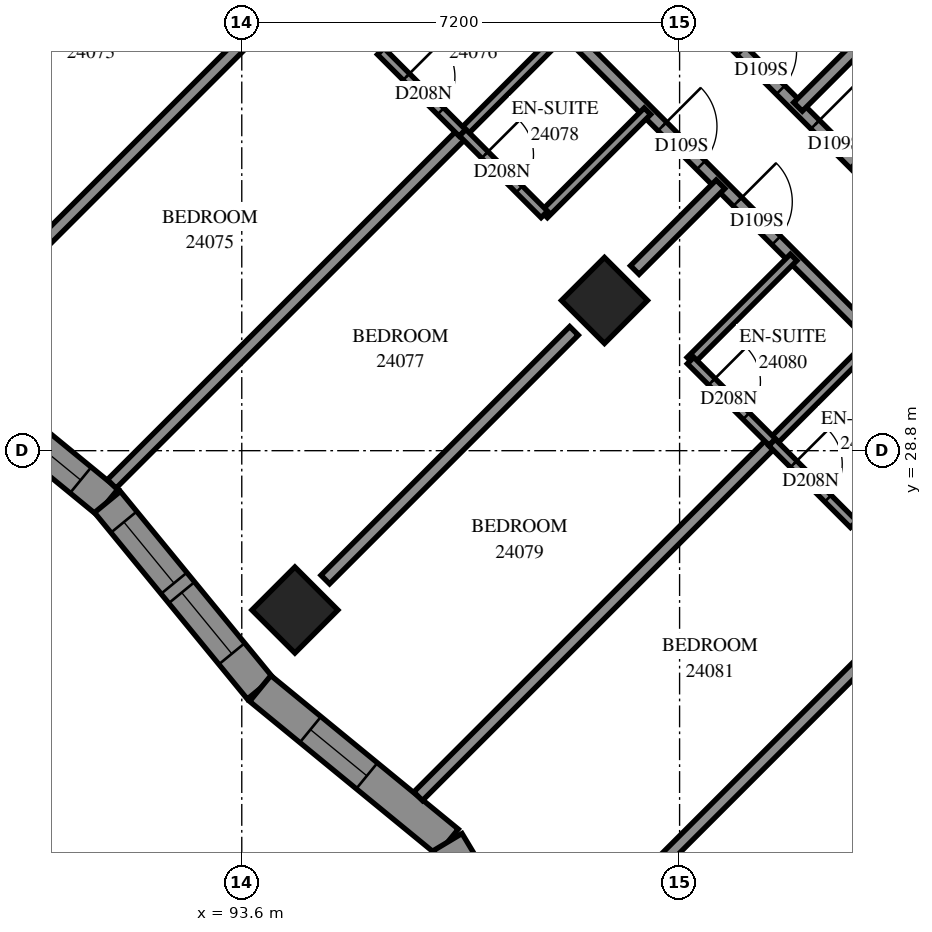
"""IFC4 building model, lengths in metres.
Left out: names, types, materials, properties, quantities, classifications, styles, units other than length and angle.
Written with IfcOpenShell. Run it as: python <this file> out.ifc"""

import sys

from ifc_helpers import new_model, si_unit, direction, frame, frame_2d, origin, origin_2d, place, context, subcontext, project, spatial, polyline, rectangle, outline, extrude, element, fill, save


model = new_model("IFC4")
c1 = context("Model", 3, precision=1e-05, world=origin(), true_north=direction((0.0, 1.0)))
c2 = subcontext(c1, "Body", "Model", "MODEL_VIEW")
j1 = project(units=[si_unit("LENGTHUNIT", "METRE"), si_unit("PLANEANGLEUNIT", "RADIAN")], contexts=[c1])
p1 = place(None, origin())
s1 = spatial("IfcSite", under=j1, at=p1, CompositionType="ELEMENT")
p2 = place(p1, origin())
s2 = spatial("IfcBuilding", under=s1, at=p2, CompositionType="ELEMENT")
p3 = place(p2, frame((0.0, 0.0, 91.4)))
s3 = spatial("IfcBuildingStorey", under=s2, at=p3, CompositionType="ELEMENT", Elevation=91.4)
for number, where, z_axis, x_axis in (
    (1, (99.565, 31.271, 0.0), (0.0, 0.0, 1.0), (0.707, -0.707, 0.0)),
    (2, (94.474, 26.18, 0.0), (0.0, 0.0, 1.0), (0.707, -0.707, 0.0)),
):
    element("IfcColumn", number, at=place(p3, frame(where, z_axis=z_axis, x_axis=x_axis)), inside=s3, PredefinedType="COLUMN", context=c2, shape_type="SweptSolid", body=[
        extrude(rectangle(XDim=1.0, YDim=1.0, at=origin_2d()), origin(), (0.0, 0.0, 1.0), 3.1),
    ])
p4 = place(p3, frame((88.324, 30.47, 0.0), z_axis=(0.0, 0.0, 1.0), x_axis=(0.7733872397, -0.6339338904, 0.0)))
e3 = element("IfcWall", 3, at=p4, inside=s3, PredefinedType="SOLIDWALL", context=c2, shape_type="SweptSolid", body=[
    extrude(outline(polyline([(-0.027, -0.275), (3.938, -0.275), (3.992, 0.275), (0.027, 0.275), (-0.027, -0.275)])), origin(), (0.0, 0.0, 1.0), 3.1),
])
p5 = place(p4, frame((0.596, 0.0, 0.5)))
e4 = element("IfcOpeningElement", 4, at=p5, cuts=e3, PredefinedType="OPENING", context=c2, shape_type="SweptSolid", body=[
    extrude(rectangle(XDim=1.3, YDim=2.45, at=frame_2d((0.65, 1.225))), frame((0.0, 0.285, 0.0), z_axis=(0.0, -1.0, 0.0), x_axis=(1.0, 0.0, 0.0)), (0.0, 0.0, 1.0), 0.57),
])
p6 = place(p4, frame((2.096, 0.0, 0.5)))
e5 = element("IfcOpeningElement", 5, at=p6, cuts=e3, PredefinedType="OPENING", context=c2, shape_type="SweptSolid", body=[
    extrude(rectangle(XDim=1.3, YDim=2.45, at=frame_2d((0.65, 1.225))), frame((0.0, 0.285, 0.0), z_axis=(0.0, -1.0, 0.0), x_axis=(1.0, 0.0, 0.0)), (0.0, 0.0, 1.0), 0.57),
])
p7 = place(p3, frame((91.391, 27.956, 0.0), z_axis=(0.0, 0.0, 1.0), x_axis=(0.633918804, -0.7733996056, 0.0)))
e6 = element("IfcWall", 6, at=p7, inside=s3, PredefinedType="SOLIDWALL", context=c2, shape_type="SweptSolid", body=[
    extrude(outline(polyline([(0.027, -0.275), (3.992, -0.275), (3.938, 0.275), (-0.027, 0.275), (0.027, -0.275)])), origin(), (0.0, 0.0, 1.0), 3.1),
])
p8 = place(p7, frame((0.426, 0.0, 0.5)))
e7 = element("IfcOpeningElement", 7, at=p8, cuts=e6, PredefinedType="OPENING", context=c2, shape_type="SweptSolid", body=[
    extrude(rectangle(XDim=1.3, YDim=2.45, at=frame_2d((0.65, 1.225))), frame((0.0, 0.285, 0.0), z_axis=(0.0, -1.0, 0.0), x_axis=(1.0, 0.0, 0.0)), (0.0, 0.0, 1.0), 0.57),
])
p9 = place(p7, frame((1.927, 0.0, 0.5)))
e8 = element("IfcOpeningElement", 8, at=p9, cuts=e6, PredefinedType="OPENING", context=c2, shape_type="SweptSolid", body=[
    extrude(rectangle(XDim=1.3, YDim=2.45, at=frame_2d((0.65, 1.225))), frame((0.0, 0.285, 0.0), z_axis=(0.0, -1.0, 0.0), x_axis=(1.0, 0.0, 0.0)), (0.0, 0.0, 1.0), 0.57),
])
p10 = place(p3, frame((93.904, 24.89, 0.0), z_axis=(0.0, 0.0, 1.0), x_axis=(0.7734013817, -0.6339166371, 0.0)))
e9 = element("IfcWall", 9, at=p10, inside=s3, PredefinedType="SOLIDWALL", context=c2, shape_type="SweptSolid", body=[
    extrude(outline(polyline([(-0.027, -0.275), (3.938, -0.275), (4.033, 0.275), (0.027, 0.275), (-0.027, -0.275)])), origin(), (0.0, 0.0, 1.0), 3.1),
])
p11 = place(p10, frame((1.067, 0.0, 0.5)))
e10 = element("IfcOpeningElement", 10, at=p11, cuts=e9, PredefinedType="OPENING", context=c2, shape_type="SweptSolid", body=[
    extrude(rectangle(XDim=1.2, YDim=2.45, at=frame_2d((0.6, 1.225))), frame((0.0, 0.285, 0.0), z_axis=(0.0, -1.0, 0.0), x_axis=(1.0, 0.0, 0.0)), (0.0, 0.0, 1.0), 0.57),
])
p12 = place(p3, frame((96.986, 22.363, 0.0), z_axis=(0.0, 0.0, 1.0), x_axis=(0.5135466486, -0.8580616759, 0.0)))
e11 = element("IfcWall", 11, at=p12, inside=s3, PredefinedType="SOLIDWALL", context=c2, shape_type="SweptSolid", body=[
    extrude(outline(polyline([(0.048, -0.275), (4.116, -0.275), (3.665, 0.275), (-0.048, 0.275), (0.048, -0.275)])), origin(), (0.0, 0.0, 1.0), 3.1),
])
p13 = place(p12, frame((0.905, 0.0, 0.5)))
e12 = element("IfcOpeningElement", 12, at=p13, cuts=e11, PredefinedType="OPENING", context=c2, shape_type="SweptSolid", body=[
    extrude(rectangle(XDim=1.2, YDim=2.45, at=frame_2d((0.6, 1.225))), frame((0.0, 0.285, 0.0), z_axis=(0.0, -1.0, 0.0), x_axis=(1.0, 0.0, 0.0)), (0.0, 0.0, 1.0), 0.57),
])
p14 = place(p3, frame((93.339, 41.309, 0.0), z_axis=(0.0, 0.0, 1.0), x_axis=(0.7071067812, -0.7071067812, 0.0)))
e13 = element("IfcWall", 13, at=p14, inside=s3, PredefinedType="PARTITIONING", context=c2, shape_type="SweptSolid", body=[
    extrude(rectangle(XDim=18.702, YDim=0.2, at=frame_2d((9.351, 0.0))), origin(), (0.0, 0.0, 1.0), 3.1),
])
p15 = place(p14, frame((3.05, 0.0, 0.0)))
e14 = element("IfcOpeningElement", 14, at=p15, cuts=e13, PredefinedType="OPENING", context=c2, shape_type="SweptSolid", body=[
    extrude(rectangle(XDim=0.9, YDim=2.1, at=frame_2d((0.45, 1.05))), frame((0.0, 0.11, 0.0), z_axis=(0.0, -1.0, 0.0), x_axis=(1.0, 0.0, 0.0)), (0.0, 0.0, 1.0), 0.22),
])
p16 = place(p14, frame((4.7, 0.0, 0.0)))
e15 = element("IfcOpeningElement", 15, at=p16, cuts=e13, PredefinedType="OPENING", context=c2, shape_type="SweptSolid", body=[
    extrude(rectangle(XDim=0.9, YDim=2.1, at=frame_2d((0.45, 1.05))), frame((0.0, 0.11, 0.0), z_axis=(0.0, -1.0, 0.0), x_axis=(1.0, 0.0, 0.0)), (0.0, 0.0, 1.0), 0.22),
])
p17 = place(p14, frame((10.149, 0.0, 0.0)))
e16 = element("IfcOpeningElement", 16, at=p17, cuts=e13, PredefinedType="OPENING", context=c2, shape_type="SweptSolid", body=[
    extrude(rectangle(XDim=0.9, YDim=2.1, at=frame_2d((0.45, 1.05))), frame((0.0, 0.11, 0.0), z_axis=(0.0, -1.0, 0.0), x_axis=(1.0, 0.0, 0.0)), (0.0, 0.0, 1.0), 0.22),
])
p18 = place(p14, frame((11.9, 0.0, 0.0)))
e17 = element("IfcOpeningElement", 17, at=p18, cuts=e13, PredefinedType="OPENING", context=c2, shape_type="SweptSolid", body=[
    extrude(rectangle(XDim=0.9, YDim=2.1, at=frame_2d((0.45, 1.05))), frame((0.0, 0.11, 0.0), z_axis=(0.0, -1.0, 0.0), x_axis=(1.0, 0.0, 0.0)), (0.0, 0.0, 1.0), 0.22),
])
p19 = place(p14, frame((17.45, 0.0, 0.0)))
e18 = element("IfcOpeningElement", 18, at=p19, cuts=e13, PredefinedType="OPENING", context=c2, shape_type="SweptSolid", body=[
    extrude(rectangle(XDim=0.9, YDim=2.1, at=frame_2d((0.45, 1.05))), frame((0.0, 0.11, 0.0), z_axis=(0.0, -1.0, 0.0), x_axis=(1.0, 0.0, 0.0)), (0.0, 0.0, 1.0), 0.22),
])
p20 = place(p3, frame((86.835, 34.806, 0.0), z_axis=(0.0, 0.0, 1.0), x_axis=(0.7071067812, 0.7071067812, 0.0)))
e19 = element("IfcWall", 19, at=p20, inside=s3, PredefinedType="PARTITIONING", context=c2, shape_type="SweptSolid", body=[
    extrude(rectangle(XDim=9.201, YDim=0.2, at=frame_2d((4.601, 0.0))), origin(), (0.0, 0.0, 1.0), 3.1),
])
p21 = place(p3, frame((96.501, 23.117, 0.0), z_axis=(0.0, 0.0, 1.0), x_axis=(0.7071128537, 0.7071007086, 0.0)))
e20 = element("IfcWall", 20, at=p21, inside=s3, PredefinedType="PARTITIONING", context=c2, shape_type="SweptSolid", body=[
    extrude(rectangle(XDim=8.234, YDim=0.2, at=frame_2d((4.117, 0.0))), origin(), (0.0, 0.0, 1.0), 3.1),
])
p22 = place(p3, frame((86.345, 33.319, 0.0), z_axis=(0.0, 0.0, 1.0), x_axis=(0.7069848221, 0.7072287193, 0.0)))
e21 = element("IfcWall", 21, at=p22, inside=s3, PredefinedType="PARTITIONING", context=c2, shape_type="SweptSolid", body=[
    extrude(rectangle(XDim=8.2, YDim=0.2, at=frame_2d((4.1, 0.0))), origin(), (0.0, 0.0, 1.0), 3.1),
])
p23 = place(p3, frame((91.462, 28.254, 0.0), z_axis=(0.0, 0.0, 1.0), x_axis=(0.7072292685, 0.7069842727, 0.0)))
e22 = element("IfcWall", 22, at=p23, inside=s3, PredefinedType="PARTITIONING", context=c2, shape_type="SweptSolid", body=[
    extrude(rectangle(XDim=8.163, YDim=0.2, at=frame_2d((4.082, 0.0))), origin(), (0.0, 0.0, 1.0), 3.1),
])
p24 = place(p3, frame((100.062, 21.588, 0.0), z_axis=(0.0, 0.0, 1.0), x_axis=(0.7071067812, 0.7071067812, 0.0)))
e23 = element("IfcWall", 23, at=p24, inside=s3, PredefinedType="PARTITIONING", context=c2, shape_type="SweptSolid", body=[
    extrude(rectangle(XDim=5.79, YDim=0.2, at=frame_2d((2.895, 0.0))), origin(), (0.0, 0.0, 1.0), 2.6),
])
p25 = place(p3, frame((89.881, 31.771, 0.0), z_axis=(0.0, 0.0, 1.0), x_axis=(0.7071067812, 0.7071067812, 0.0)))
e24 = element("IfcWall", 24, at=p25, inside=s3, PredefinedType="PARTITIONING", context=c2, shape_type="SweptSolid", body=[
    extrude(rectangle(XDim=5.787, YDim=0.2, at=frame_2d((2.893, 0.0))), origin(), (0.0, 0.0, 1.0), 3.1),
])
p26 = place(p3, frame((94.973, 26.681, 0.0), z_axis=(0.0, 0.0, 1.0), x_axis=(0.7071067812, 0.7071067812, 0.0)))
e25 = element("IfcWall", 25, at=p26, inside=s3, PredefinedType="PARTITIONING", context=c2, shape_type="SweptSolid", body=[
    extrude(rectangle(XDim=5.784, YDim=0.2, at=frame_2d((2.892, 0.0))), origin(), (0.0, 0.0, 1.0), 3.1),
])
p27 = place(p3, frame((101.541, 35.651, 0.0), z_axis=(0.0, 0.0, 1.0), x_axis=(0.7071067812, -0.7071067812, 0.0)))
e26 = element("IfcWall", 26, at=p27, inside=s3, PredefinedType="PARTITIONING", context=c2, shape_type="SweptSolid", body=[
    extrude(rectangle(XDim=3.4, YDim=0.2, at=frame_2d((1.7, 0.0))), origin(), (0.0, 0.0, 1.0), 3.1),
])
p28 = place(p27, frame((0.4, 0.0, 0.0)))
e27 = element("IfcOpeningElement", 27, at=p28, cuts=e26, PredefinedType="OPENING", context=c2, shape_type="SweptSolid", body=[
    extrude(rectangle(XDim=0.9, YDim=2.1, at=frame_2d((0.45, 1.05))), frame((0.0, 0.11, 0.0), z_axis=(0.0, -1.0, 0.0), x_axis=(1.0, 0.0, 0.0)), (0.0, 0.0, 1.0), 0.22),
])
p29 = place(p27, frame((2.105, 0.0, 0.0)))
e28 = element("IfcOpeningElement", 28, at=p29, cuts=e26, PredefinedType="OPENING", context=c2, shape_type="SweptSolid", body=[
    extrude(rectangle(XDim=0.9, YDim=2.1, at=frame_2d((0.45, 1.05))), frame((0.0, 0.11, 0.0), z_axis=(0.0, -1.0, 0.0), x_axis=(1.0, 0.0, 0.0)), (0.0, 0.0, 1.0), 0.22),
])
for number, where, z_axis, x_axis in (
    (29, (100.977, 30.281, 0.0), (0.0, 0.0, 1.0), (0.707, 0.707, 0.0)),
    (30, (98.573, 32.685, 0.0), (0.0, 0.0, 1.0), (0.707, 0.707, 0.0)),
):
    element("IfcWall", number, at=place(p3, frame(where, z_axis=z_axis, x_axis=x_axis)), inside=s3, PredefinedType="PARTITIONING", context=c2, shape_type="SweptSolid", body=[
        extrude(rectangle(XDim=2.401, YDim=0.15, at=frame_2d((1.201, 0.0))), origin(), (0.0, 0.0, 1.0), 3.1),
    ])
p30 = place(p3, frame((97.234, 34.026, 0.0), z_axis=(0.0, 0.0, 1.0), x_axis=(0.706689978, 0.7075233388, 0.0)))
e31 = element("IfcWall", 31, at=p30, inside=s3, PredefinedType="PARTITIONING", context=c2, shape_type="SweptSolid", body=[
    extrude(rectangle(XDim=2.4, YDim=0.15, at=frame_2d((1.2, 0.0))), origin(), (0.0, 0.0, 1.0), 3.1),
])
for number, where, z_axis, x_axis in (
    (32, (95.887, 35.373, 0.0), (0.0, 0.0, 1.0), (0.707, 0.707, 0.0)),
    (33, (102.323, 28.939, 0.0), (0.0, 0.0, 1.0), (0.707, 0.707, 0.0)),
    (34, (103.665, 27.595, 0.0), (0.0, 0.0, 1.0), (0.707, 0.707, 0.0)),
):
    element("IfcWall", number, at=place(p3, frame(where, z_axis=z_axis, x_axis=x_axis)), inside=s3, PredefinedType="PARTITIONING", context=c2, shape_type="SweptSolid", body=[
        extrude(rectangle(XDim=2.398, YDim=0.15, at=frame_2d((1.199, 0.0))), origin(), (0.0, 0.0, 1.0), 3.1),
    ])
p31 = place(p3, frame((100.063, 31.771, 0.0), z_axis=(0.0, 0.0, 1.0), x_axis=(0.7071067812, 0.7071067812, 0.0)))
e35 = element("IfcWall", 35, at=p31, inside=s3, PredefinedType="PARTITIONING", context=c2, shape_type="SweptSolid", body=[
    extrude(rectangle(XDim=1.994, YDim=0.2, at=frame_2d((0.997, 0.0))), origin(), (0.0, 0.0, 1.0), 3.1),
])
p32 = place(p3, frame((102.747, 34.455, 0.0), z_axis=(0.0, 0.0, 1.0), x_axis=(0.7071067812, 0.7071067812, 0.0)))
e36 = element("IfcWall", 36, at=p32, inside=s3, PredefinedType="PARTITIONING", context=c2, shape_type="SweptSolid", body=[
    extrude(rectangle(XDim=1.991, YDim=0.2, at=frame_2d((0.996, 0.0))), origin(), (0.0, 0.0, 1.0), 3.1),
])
p33 = place(p3, frame((95.885, 35.369, 0.0), z_axis=(0.0, 0.0, 1.0), x_axis=(0.7071067812, -0.7071067812, 0.0)))
e37 = element("IfcWall", 37, at=p33, inside=s3, PredefinedType="PARTITIONING", context=c2, shape_type="SweptSolid", body=[
    extrude(rectangle(XDim=1.901, YDim=0.15, at=frame_2d((0.95, 0.0))), origin(), (0.0, 0.0, 1.0), 3.1),
])
p34 = place(p33, frame((0.595, 0.0, 0.0)))
e38 = element("IfcOpeningElement", 38, at=p34, cuts=e37, PredefinedType="OPENING", context=c2, shape_type="SweptSolid", body=[
    extrude(rectangle(XDim=0.8, YDim=2.1, at=frame_2d((0.4, 1.05))), frame((0.0, 0.085, 0.0), z_axis=(0.0, -1.0, 0.0), x_axis=(1.0, 0.0, 0.0)), (0.0, 0.0, 1.0), 0.17),
])
p35 = place(p3, frame((100.981, 30.283, 0.0), z_axis=(0.0, 0.0, 1.0), x_axis=(0.7076330979, -0.7065800724, 0.0)))
e39 = element("IfcWall", 39, at=p35, inside=s3, PredefinedType="PARTITIONING", context=c2, shape_type="SweptSolid", body=[
    extrude(rectangle(XDim=1.899, YDim=0.15, at=frame_2d((0.95, 0.0))), origin(), (0.0, 0.0, 1.0), 3.1),
])
p36 = place(p35, frame((0.493, 0.0, 0.0)))
e40 = element("IfcOpeningElement", 40, at=p36, cuts=e39, PredefinedType="OPENING", context=c2, shape_type="SweptSolid", body=[
    extrude(rectangle(XDim=0.8, YDim=2.1, at=frame_2d((0.4, 1.05))), frame((0.0, 0.085, 0.0), z_axis=(0.0, -1.0, 0.0), x_axis=(1.0, 0.0, 0.0)), (0.0, 0.0, 1.0), 0.17),
])
p37 = place(p3, frame((97.233, 34.029, 0.0), z_axis=(0.0, 0.0, 1.0), x_axis=(0.7065800724, -0.7076330979, 0.0)))
e41 = element("IfcWall", 41, at=p37, inside=s3, PredefinedType="PARTITIONING", context=c2, shape_type="SweptSolid", body=[
    extrude(rectangle(XDim=1.899, YDim=0.15, at=frame_2d((0.95, 0.0))), origin(), (0.0, 0.0, 1.0), 3.1),
])
p38 = place(p37, frame((0.515, 0.0, 0.0)))
e42 = element("IfcOpeningElement", 42, at=p38, cuts=e41, PredefinedType="OPENING", context=c2, shape_type="SweptSolid", body=[
    extrude(rectangle(XDim=0.8, YDim=2.1, at=frame_2d((0.4, 1.05))), frame((0.0, 0.085, 0.0), z_axis=(0.0, -1.0, 0.0), x_axis=(1.0, 0.0, 0.0)), (0.0, 0.0, 1.0), 0.17),
])
p39 = place(p3, frame((102.321, 28.935, 0.0), z_axis=(0.0, 0.0, 1.0), x_axis=(0.7065800724, -0.7076330979, 0.0)))
e43 = element("IfcWall", 43, at=p39, inside=s3, PredefinedType="PARTITIONING", context=c2, shape_type="SweptSolid", body=[
    extrude(rectangle(XDim=1.899, YDim=0.15, at=frame_2d((0.95, 0.0))), origin(), (0.0, 0.0, 1.0), 3.1),
])
p40 = place(p39, frame((0.501, 0.0, 0.0)))
e44 = element("IfcOpeningElement", 44, at=p40, cuts=e43, PredefinedType="OPENING", context=c2, shape_type="SweptSolid", body=[
    extrude(rectangle(XDim=0.8, YDim=2.1, at=frame_2d((0.4, 1.05))), frame((0.0, 0.085, 0.0), z_axis=(0.0, -1.0, 0.0), x_axis=(1.0, 0.0, 0.0)), (0.0, 0.0, 1.0), 0.17),
])
p41 = place(p6, origin())
e45 = element("IfcWindow", 45, at=p41, inside=s3, PartitioningType="SINGLE_PANEL", PredefinedType="WINDOW", context=c2, shape_type="SweptSolid", body=[
    extrude(rectangle(XDim=1.3, YDim=2.45, at=frame_2d((0.65, 1.225))), frame((0.0, 0.155, 0.0), z_axis=(0.0, -1.0, 0.0), x_axis=(1.0, 0.0, 0.0)), (0.0, 0.0, 1.0), 0.06),
])
fill(e5, e45)
p42 = place(p8, origin())
e46 = element("IfcWindow", 46, at=p42, inside=s3, PartitioningType="SINGLE_PANEL", PredefinedType="WINDOW", context=c2, shape_type="SweptSolid", body=[
    extrude(rectangle(XDim=1.3, YDim=2.45, at=frame_2d((0.65, 1.225))), frame((0.0, 0.155, 0.0), z_axis=(0.0, -1.0, 0.0), x_axis=(1.0, 0.0, 0.0)), (0.0, 0.0, 1.0), 0.06),
])
fill(e7, e46)
p43 = place(p9, origin())
e47 = element("IfcWindow", 47, at=p43, inside=s3, PartitioningType="SINGLE_PANEL", PredefinedType="WINDOW", context=c2, shape_type="SweptSolid", body=[
    extrude(rectangle(XDim=1.3, YDim=2.45, at=frame_2d((0.65, 1.225))), frame((0.0, 0.155, 0.0), z_axis=(0.0, -1.0, 0.0), x_axis=(1.0, 0.0, 0.0)), (0.0, 0.0, 1.0), 0.06),
])
fill(e8, e47)
p44 = place(p11, origin())
e48 = element("IfcWindow", 48, at=p44, inside=s3, PartitioningType="SINGLE_PANEL", PredefinedType="WINDOW", context=c2, shape_type="SweptSolid", body=[
    extrude(rectangle(XDim=1.2, YDim=2.45, at=frame_2d((0.6, 1.225))), frame((0.0, 0.155, 0.0), z_axis=(0.0, -1.0, 0.0), x_axis=(1.0, 0.0, 0.0)), (0.0, 0.0, 1.0), 0.06),
])
fill(e10, e48)
p45 = place(p28, origin())
e49 = element("IfcDoor", 49, at=p45, inside=s3, OperationType="SINGLE_SWING_RIGHT", PredefinedType="DOOR", context=c2, shape_type="SweptSolid", body=[
    extrude(rectangle(XDim=0.9, YDim=2.1, at=frame_2d((0.45, 1.05))), frame((0.0, 0.025, 0.0), z_axis=(0.0, -1.0, 0.0), x_axis=(1.0, 0.0, 0.0)), (0.0, 0.0, 1.0), 0.05),
])
fill(e27, e49)
p46 = place(p29, origin())
e50 = element("IfcDoor", 50, at=p46, inside=s3, OperationType="SINGLE_SWING_LEFT", PredefinedType="DOOR", context=c2, shape_type="SweptSolid", body=[
    extrude(rectangle(XDim=0.9, YDim=2.1, at=frame_2d((0.45, 1.05))), frame((0.0, 0.025, 0.0), z_axis=(0.0, -1.0, 0.0), x_axis=(1.0, 0.0, 0.0)), (0.0, 0.0, 1.0), 0.05),
])
fill(e28, e50)
p47 = place(p34, origin())
e51 = element("IfcDoor", 51, at=p47, inside=s3, OperationType="SINGLE_SWING_RIGHT", PredefinedType="DOOR", context=c2, shape_type="SweptSolid", body=[
    extrude(rectangle(XDim=0.8, YDim=2.1, at=frame_2d((0.4, 1.05))), frame((0.0, 0.025, 0.0), z_axis=(0.0, -1.0, 0.0), x_axis=(1.0, 0.0, 0.0)), (0.0, 0.0, 1.0), 0.05),
])
fill(e38, e51)
p48 = place(p17, origin())
e52 = element("IfcDoor", 52, at=p48, inside=s3, OperationType="SINGLE_SWING_LEFT", PredefinedType="DOOR", context=c2, shape_type="SweptSolid", body=[
    extrude(rectangle(XDim=0.9, YDim=2.1, at=frame_2d((0.45, 1.05))), frame((0.0, 0.025, 0.0), z_axis=(0.0, -1.0, 0.0), x_axis=(1.0, 0.0, 0.0)), (0.0, 0.0, 1.0), 0.05),
])
fill(e16, e52)
p49 = place(p38, origin())
e53 = element("IfcDoor", 53, at=p49, inside=s3, OperationType="SINGLE_SWING_RIGHT", PredefinedType="DOOR", context=c2, shape_type="SweptSolid", body=[
    extrude(rectangle(XDim=0.8, YDim=2.1, at=frame_2d((0.4, 1.05))), frame((0.0, 0.025, 0.0), z_axis=(0.0, -1.0, 0.0), x_axis=(1.0, 0.0, 0.0)), (0.0, 0.0, 1.0), 0.05),
])
fill(e42, e53)
p50 = place(p18, origin())
e54 = element("IfcDoor", 54, at=p50, inside=s3, OperationType="SINGLE_SWING_RIGHT", PredefinedType="DOOR", context=c2, shape_type="SweptSolid", body=[
    extrude(rectangle(XDim=0.9, YDim=2.1, at=frame_2d((0.45, 1.05))), frame((0.0, 0.025, 0.0), z_axis=(0.0, -1.0, 0.0), x_axis=(1.0, 0.0, 0.0)), (0.0, 0.0, 1.0), 0.05),
])
fill(e17, e54)
p51 = place(p36, origin())
e55 = element("IfcDoor", 55, at=p51, inside=s3, OperationType="SINGLE_SWING_RIGHT", PredefinedType="DOOR", context=c2, shape_type="SweptSolid", body=[
    extrude(rectangle(XDim=0.8, YDim=2.1, at=frame_2d((0.4, 1.05))), frame((0.0, 0.025, 0.0), z_axis=(0.0, -1.0, 0.0), x_axis=(1.0, 0.0, 0.0)), (0.0, 0.0, 1.0), 0.05),
])
fill(e40, e55)
p52 = place(p40, origin())
e56 = element("IfcDoor", 56, at=p52, inside=s3, OperationType="SINGLE_SWING_RIGHT", PredefinedType="DOOR", context=c2, shape_type="SweptSolid", body=[
    extrude(rectangle(XDim=0.8, YDim=2.1, at=frame_2d((0.4, 1.05))), frame((0.0, 0.025, 0.0), z_axis=(0.0, -1.0, 0.0), x_axis=(1.0, 0.0, 0.0)), (0.0, 0.0, 1.0), 0.05),
])
fill(e44, e56)
save(model, sys.argv[1])
